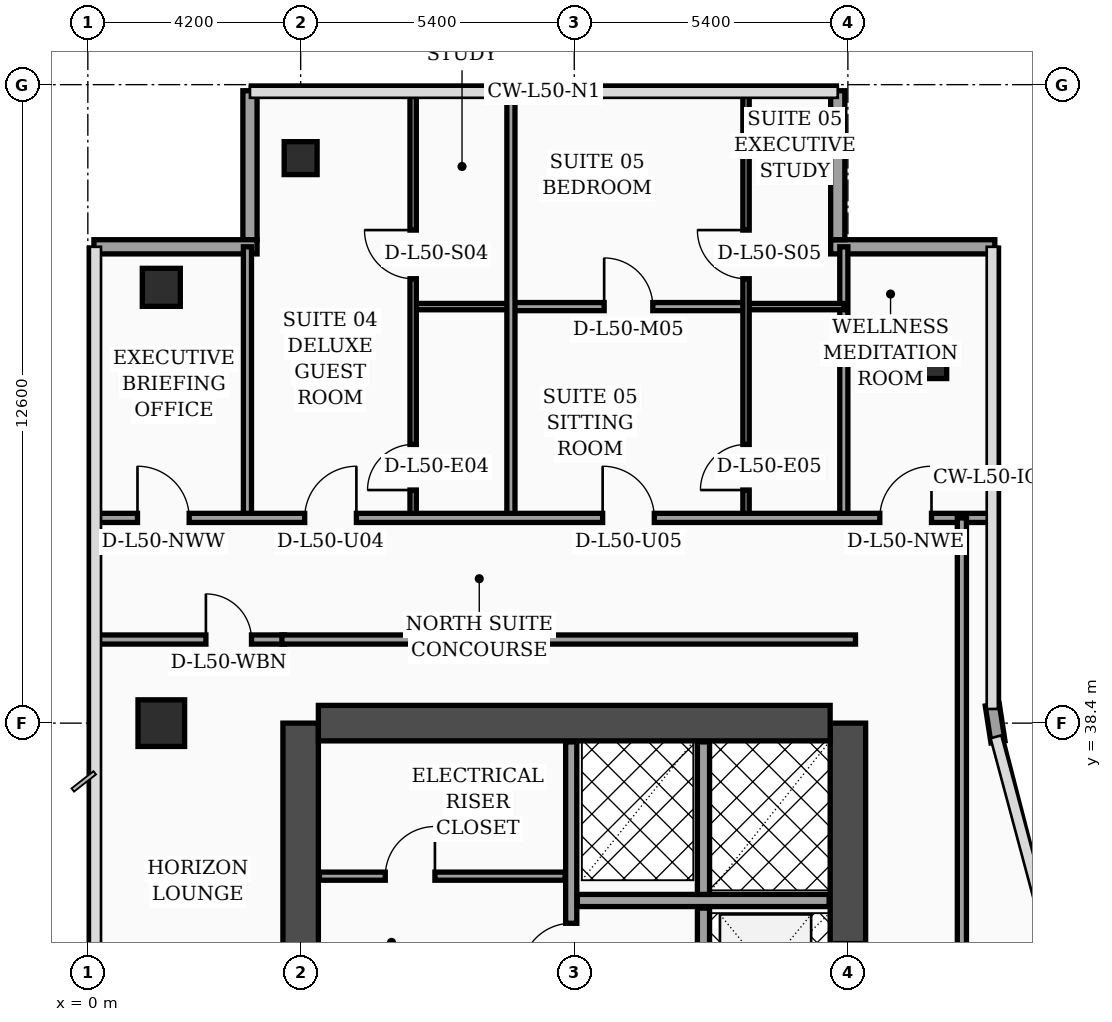
"""IFC4 building model, lengths in metres.
Left out: names, types, materials, properties, quantities, classifications, styles, units other than length and angle.
Written with IfcOpenShell. Run it as: python <this file> out.ifc"""

import sys

from ifc_helpers import new_model, si_unit, direction, frame, frame_2d, origin, origin_2d, place, context, subcontext, project, spatial, rectangle, hollow_rectangle, extrude, element, fill, save


model = new_model("IFC4")
c1 = context("Model", 3, precision=1e-05, world=origin(), true_north=direction((0.0, 1.0)))
c2 = subcontext(c1, "Body", "Model", "MODEL_VIEW")
j1 = project(units=[si_unit("LENGTHUNIT", "METRE"), si_unit("PLANEANGLEUNIT", "RADIAN")], contexts=[c1])
p1 = place(None, origin())
s1 = spatial("IfcSite", under=j1, at=p1, CompositionType="ELEMENT")
p2 = place(p1, origin())
s2 = spatial("IfcBuilding", under=s1, at=p2, CompositionType="ELEMENT")
p3 = place(p2, frame((0.0, 0.0, 203.4)))
s3 = spatial("IfcBuildingStorey", under=s2, at=p3, CompositionType="ELEMENT", Elevation=203.4)
p4 = place(p3, frame((4.2, 16.8, 0.0), z_axis=(0.0, 0.0, 1.0), x_axis=(0.0, 1.0, 0.0)))
e1 = element("IfcWall", 1, at=p4, inside=s3, PredefinedType="SHEAR", context=c2, shape_type="SweptSolid", body=[
    extrude(rectangle(XDim=21.6, YDim=0.7, at=frame_2d((10.8, 0.0))), origin(), (0.0, 0.0, 1.0), 3.56),
])
p5 = place(p3, frame((15.0, 16.8, 0.0), z_axis=(0.0, 0.0, 1.0), x_axis=(0.0, 1.0, 0.0)))
e2 = element("IfcWall", 2, at=p5, inside=s3, PredefinedType="SHEAR", context=c2, shape_type="SweptSolid", body=[
    extrude(rectangle(XDim=21.6, YDim=0.7, at=frame_2d((10.8, 0.0))), origin(), (0.0, 0.0, 1.0), 3.56),
])
p6 = place(p5, frame((8.65, 0.0, 0.0)))
e3 = element("IfcOpeningElement", 3, at=p6, cuts=e2, PredefinedType="OPENING", context=c2, shape_type="SweptSolid", body=[
    extrude(rectangle(XDim=1.1, YDim=2.2, at=frame_2d((0.55, 1.1))), frame((0.0, 0.36, 0.0), z_axis=(0.0, -1.0, 0.0), x_axis=(1.0, 0.0, 0.0)), (0.0, 0.0, 1.0), 0.72),
])
p7 = place(p5, frame((10.85, 0.0, 0.0)))
e4 = element("IfcOpeningElement", 4, at=p7, cuts=e2, PredefinedType="OPENING", context=c2, shape_type="SweptSolid", body=[
    extrude(rectangle(XDim=1.1, YDim=2.2, at=frame_2d((0.55, 1.1))), frame((0.0, 0.36, 0.0), z_axis=(0.0, -1.0, 0.0), x_axis=(1.0, 0.0, 0.0)), (0.0, 0.0, 1.0), 0.72),
])
p8 = place(p5, frame((13.5, 0.0, 0.0)))
e5 = element("IfcOpeningElement", 5, at=p8, cuts=e2, PredefinedType="OPENING", context=c2, shape_type="SweptSolid", body=[
    extrude(rectangle(XDim=1.1, YDim=2.2, at=frame_2d((0.55, 1.1))), frame((0.0, 0.36, 0.0), z_axis=(0.0, -1.0, 0.0), x_axis=(1.0, 0.0, 0.0)), (0.0, 0.0, 1.0), 0.72),
])
p9 = place(p5, frame((16.15, 0.0, 0.0)))
e6 = element("IfcOpeningElement", 6, at=p9, cuts=e2, PredefinedType="OPENING", context=c2, shape_type="SweptSolid", body=[
    extrude(rectangle(XDim=1.1, YDim=2.2, at=frame_2d((0.55, 1.1))), frame((0.0, 0.36, 0.0), z_axis=(0.0, -1.0, 0.0), x_axis=(1.0, 0.0, 0.0)), (0.0, 0.0, 1.0), 0.72),
])
p10 = place(p3, frame((4.55, 38.4, 0.0), z_axis=(0.0, 0.0, 1.0), x_axis=(1.0, 0.0, 0.0)))
e7 = element("IfcWall", 7, at=p10, inside=s3, PredefinedType="SHEAR", context=c2, shape_type="SweptSolid", body=[
    extrude(rectangle(XDim=10.1, YDim=0.7, at=frame_2d((5.05, 0.0))), origin(), (0.0, 0.0, 1.0), 3.56),
])
p11 = place(p3, frame((1.45, 38.4, 0.0), z_axis=(0.0, 0.0, 1.0), x_axis=(1.0, 0.0, 0.0)))
e8 = element("IfcColumn", 8, at=p11, inside=s3, PredefinedType="COLUMN", context=c2, shape_type="SweptSolid", body=[
    extrude(rectangle(XDim=0.92, YDim=0.92, at=origin_2d()), origin(), (0.0, 0.0, 1.0), 3.56),
])
p12 = place(p3, frame((1.45, 47.0, 0.0), z_axis=(0.0, 0.0, 1.0), x_axis=(1.0, 0.0, 0.0)))
e9 = element("IfcColumn", 9, at=p12, inside=s3, PredefinedType="COLUMN", context=c2, shape_type="SweptSolid", body=[
    extrude(hollow_rectangle(XDim=0.75, YDim=0.75, WallThickness=0.032, at=origin_2d()), origin(), (0.0, 0.0, 1.0), 3.56),
])
p13 = place(p3, frame((4.2, 49.55, 0.0), z_axis=(0.0, 0.0, 1.0), x_axis=(1.0, 0.0, 0.0)))
e10 = element("IfcColumn", 10, at=p13, inside=s3, PredefinedType="COLUMN", context=c2, shape_type="SweptSolid", body=[
    extrude(hollow_rectangle(XDim=0.65, YDim=0.65, WallThickness=0.028, at=origin_2d()), origin(), (0.0, 0.0, 1.0), 3.56),
])
p14 = place(p3, frame((16.55, 45.6, 0.0), z_axis=(0.0, 0.0, 1.0), x_axis=(1.0, 0.0, 0.0)))
e11 = element("IfcColumn", 11, at=p14, inside=s3, PredefinedType="COLUMN", context=c2, shape_type="SweptSolid", body=[
    extrude(rectangle(XDim=0.8, YDim=0.8, at=origin_2d()), origin(), (0.0, 0.0, 1.0), 3.56),
])
p15 = place(p3, frame((17.962, 38.03, 0.0), z_axis=(0.0, 0.0, 1.0), x_axis=(-0.15141125477, 0.988470855377, 0.0)))
e12 = element("IfcWall", 12, at=p15, inside=s3, PredefinedType="SOLIDWALL", context=c2, shape_type="SweptSolid", body=[
    extrude(rectangle(XDim=0.739, YDim=0.28, at=frame_2d((0.369, 0.0))), origin(), (0.0, 0.0, 1.0), 3.56),
])
p16 = place(p3, frame((17.9, 47.8, 0.0), z_axis=(0.0, 0.0, 1.0), x_axis=(-1.0, 0.0, 0.0)))
e13 = element("IfcWall", 13, at=p16, inside=s3, PredefinedType="SOLIDWALL", context=c2, shape_type="SweptSolid", body=[
    extrude(rectangle(XDim=3.24, YDim=0.28, at=frame_2d((1.62, 0.0))), origin(), (0.0, 0.0, 1.0), 3.56),
])
p17 = place(p3, frame((14.8, 47.94, 0.0), z_axis=(0.0, 0.0, 1.0), x_axis=(0.0, 1.0, 0.0)))
e14 = element("IfcWall", 14, at=p17, inside=s3, PredefinedType="SOLIDWALL", context=c2, shape_type="SweptSolid", body=[
    extrude(rectangle(XDim=2.94, YDim=0.28, at=frame_2d((1.47, 0.0))), origin(), (0.0, 0.0, 1.0), 3.56),
])
p18 = place(p3, frame((3.2, 50.88, 0.0), z_axis=(0.0, 0.0, 1.0), x_axis=(0.0, -1.0, 0.0)))
e15 = element("IfcWall", 15, at=p18, inside=s3, PredefinedType="SOLIDWALL", context=c2, shape_type="SweptSolid", body=[
    extrude(rectangle(XDim=2.94, YDim=0.28, at=frame_2d((1.47, 0.0))), origin(), (0.0, 0.0, 1.0), 3.09),
])
p19 = place(p3, frame((3.34, 47.8, 0.0), z_axis=(0.0, 0.0, 1.0), x_axis=(-1.0, 0.0, 0.0)))
e16 = element("IfcWall", 16, at=p19, inside=s3, PredefinedType="SOLIDWALL", context=c2, shape_type="SweptSolid", body=[
    extrude(rectangle(XDim=3.22, YDim=0.28, at=frame_2d((1.61, 0.0))), origin(), (0.0, 0.0, 1.0), 3.09),
])
p20 = place(p3, frame((4.57, 35.38, 0.0), z_axis=(0.0, 0.0, 1.0), x_axis=(1.0, 0.0, 0.0)))
e17 = element("IfcWall", 17, at=p20, inside=s3, PredefinedType="PARTITIONING", context=c2, shape_type="SweptSolid", body=[
    extrude(rectangle(XDim=4.85, YDim=0.16, at=frame_2d((2.425, 0.0))), origin(), (0.0, 0.0, 1.0), 3.56),
])
p21 = place(p20, frame((1.3, 0.0, 0.0)))
e18 = element("IfcOpeningElement", 18, at=p21, cuts=e17, PredefinedType="OPENING", context=c2, shape_type="SweptSolid", body=[
    extrude(rectangle(XDim=0.98, YDim=2.15, at=frame_2d((0.49, 1.075))), frame((0.0, 0.09, 0.0), z_axis=(0.0, -1.0, 0.0), x_axis=(1.0, 0.0, 0.0)), (0.0, 0.0, 1.0), 0.18),
])
p22 = place(p3, frame((9.54, 32.92, 0.0), z_axis=(0.0, 0.0, 1.0), x_axis=(0.0, 1.0, 0.0)))
e19 = element("IfcWall", 19, at=p22, inside=s3, PredefinedType="SOLIDWALL", context=c2, shape_type="SweptSolid", body=[
    extrude(rectangle(XDim=5.11, YDim=0.22, at=frame_2d((2.555, 0.0))), origin(), (0.0, 0.0, 1.0), 3.56),
])
p23 = place(p22, frame((0.55, 0.0, 0.0)))
e20 = element("IfcOpeningElement", 20, at=p23, cuts=e19, PredefinedType="OPENING", context=c2, shape_type="SweptSolid", body=[
    extrude(rectangle(XDim=0.98, YDim=2.15, at=frame_2d((0.49, 1.075))), frame((0.0, 0.12, 0.0), z_axis=(0.0, -1.0, 0.0), x_axis=(1.0, 0.0, 0.0)), (0.0, 0.0, 1.0), 0.24),
])
p24 = place(p3, frame((12.15, 27.0, 0.0), z_axis=(0.0, 0.0, 1.0), x_axis=(0.0, 1.0, 0.0)))
e21 = element("IfcWall", 21, at=p24, inside=s3, PredefinedType="SOLIDWALL", context=c2, shape_type="SweptSolid", body=[
    extrude(rectangle(XDim=7.75, YDim=0.24, at=frame_2d((3.875, 0.0))), origin(), (0.0, 0.0, 1.0), 3.56),
])
p25 = place(p3, frame((9.66, 34.9, 0.0), z_axis=(0.0, 0.0, 1.0), x_axis=(1.0, 0.0, 0.0)))
e22 = element("IfcWall", 22, at=p25, inside=s3, PredefinedType="SOLIDWALL", context=c2, shape_type="SweptSolid", body=[
    extrude(rectangle(XDim=4.97, YDim=0.24, at=frame_2d((2.485, 0.0))), origin(), (0.0, 0.0, 1.0), 3.56),
])
p26 = place(p3, frame((12.15, 35.02, 0.0), z_axis=(0.0, 0.0, 1.0), x_axis=(0.0, 1.0, 0.0)))
e23 = element("IfcWall", 23, at=p26, inside=s3, PredefinedType="SOLIDWALL", context=c2, shape_type="SweptSolid", body=[
    extrude(rectangle(XDim=3.01, YDim=0.24, at=frame_2d((1.505, 0.0))), origin(), (0.0, 0.0, 1.0), 3.56),
])
p27 = place(p3, frame((0.08, 40.05, 0.0), z_axis=(0.0, 0.0, 1.0), x_axis=(1.0, 0.0, 0.0)))
e24 = element("IfcWall", 24, at=p27, inside=s3, PredefinedType="PARTITIONING", context=c2, shape_type="SweptSolid", body=[
    extrude(rectangle(XDim=3.8, YDim=0.18, at=frame_2d((1.9, 0.0))), origin(), (0.0, 0.0, 1.0), 2.94),
])
p28 = place(p27, frame((2.25, 0.0, 0.0)))
e25 = element("IfcOpeningElement", 25, at=p28, cuts=e24, PredefinedType="OPENING", context=c2, shape_type="SweptSolid", body=[
    extrude(rectangle(XDim=0.9, YDim=2.15, at=frame_2d((0.45, 1.075))), frame((0.0, 0.1, 0.0), z_axis=(0.0, -1.0, 0.0), x_axis=(1.0, 0.0, 0.0)), (0.0, 0.0, 1.0), 0.2),
])
p29 = place(p3, frame((3.15, 42.45, 0.0), z_axis=(0.0, 0.0, 1.0), x_axis=(0.0, 1.0, 0.0)))
e26 = element("IfcWall", 26, at=p29, inside=s3, PredefinedType="PARTITIONING", context=c2, shape_type="SweptSolid", body=[
    extrude(rectangle(XDim=5.35, YDim=0.16, at=frame_2d((2.675, 0.0))), origin(), (0.0, 0.0, 1.0), 3.14),
])
p30 = place(p3, frame((14.92, 42.45, 0.0), z_axis=(0.0, 0.0, 1.0), x_axis=(0.0, 1.0, 0.0)))
e27 = element("IfcWall", 27, at=p30, inside=s3, PredefinedType="PARTITIONING", context=c2, shape_type="SweptSolid", body=[
    extrude(rectangle(XDim=5.35, YDim=0.16, at=frame_2d((2.675, 0.0))), origin(), (0.0, 0.0, 1.0), 3.09),
])
p31 = place(p3, frame((6.42, 46.62, 0.0), z_axis=(0.0, 0.0, 1.0), x_axis=(1.0, 0.0, 0.0)))
e28 = element("IfcWall", 28, at=p31, inside=s3, PredefinedType="PARTITIONING", context=c2, shape_type="SweptSolid", body=[
    extrude(rectangle(XDim=1.93, YDim=0.125, at=frame_2d((0.965, 0.0))), origin(), (0.0, 0.0, 1.0), 3.56),
])
p32 = place(p3, frame((6.42, 42.45, 0.0), z_axis=(0.0, 0.0, 1.0), x_axis=(0.0, 1.0, 0.0)))
e29 = element("IfcWall", 29, at=p32, inside=s3, PredefinedType="PARTITIONING", context=c2, shape_type="SweptSolid", body=[
    extrude(rectangle(XDim=8.49, YDim=0.125, at=frame_2d((4.245, 0.0))), origin(), (0.0, 0.0, 1.0), 3.09),
])
p33 = place(p32, frame((0.55, 0.0, 0.0)))
e30 = element("IfcOpeningElement", 30, at=p33, cuts=e29, PredefinedType="OPENING", context=c2, shape_type="SweptSolid", body=[
    extrude(rectangle(XDim=0.9, YDim=2.15, at=frame_2d((0.45, 1.075))), frame((0.0, 0.073, 0.0), z_axis=(0.0, -1.0, 0.0), x_axis=(1.0, 0.0, 0.0)), (0.0, 0.0, 1.0), 0.145),
])
p34 = place(p32, frame((4.72, 0.0, 0.0)))
e31 = element("IfcOpeningElement", 31, at=p34, cuts=e29, PredefinedType="OPENING", context=c2, shape_type="SweptSolid", body=[
    extrude(rectangle(XDim=0.96, YDim=2.2, at=frame_2d((0.48, 1.1))), frame((0.0, 0.073, 0.0), z_axis=(0.0, -1.0, 0.0), x_axis=(1.0, 0.0, 0.0)), (0.0, 0.0, 1.0), 0.145),
])
p35 = place(p3, frame((12.99, 46.62, 0.0), z_axis=(0.0, 0.0, 1.0), x_axis=(1.0, 0.0, 0.0)))
e32 = element("IfcWall", 32, at=p35, inside=s3, PredefinedType="PARTITIONING", context=c2, shape_type="SweptSolid", body=[
    extrude(rectangle(XDim=1.93, YDim=0.125, at=frame_2d((0.965, 0.0))), origin(), (0.0, 0.0, 1.0), 3.09),
])
p36 = place(p3, frame((8.35, 46.62, 0.0), z_axis=(0.0, 0.0, 1.0), x_axis=(1.0, 0.0, 0.0)))
e33 = element("IfcWall", 33, at=p36, inside=s3, PredefinedType="PARTITIONING", context=c2, shape_type="SweptSolid", body=[
    extrude(rectangle(XDim=4.64, YDim=0.16, at=frame_2d((2.32, 0.0))), origin(), (0.0, 0.0, 1.0), 3.09),
])
p37 = place(p36, frame((1.84, 0.0, 0.0)))
e34 = element("IfcOpeningElement", 34, at=p37, cuts=e33, PredefinedType="OPENING", context=c2, shape_type="SweptSolid", body=[
    extrude(rectangle(XDim=0.96, YDim=2.2, at=frame_2d((0.48, 1.1))), frame((0.0, 0.09, 0.0), z_axis=(0.0, -1.0, 0.0), x_axis=(1.0, 0.0, 0.0)), (0.0, 0.0, 1.0), 0.18),
])
p38 = place(p3, frame((12.99, 42.45, 0.0), z_axis=(0.0, 0.0, 1.0), x_axis=(0.0, 1.0, 0.0)))
e35 = element("IfcWall", 35, at=p38, inside=s3, PredefinedType="PARTITIONING", context=c2, shape_type="SweptSolid", body=[
    extrude(rectangle(XDim=8.49, YDim=0.125, at=frame_2d((4.245, 0.0))), origin(), (0.0, 0.0, 1.0), 3.09),
])
p39 = place(p38, frame((0.55, 0.0, 0.0)))
e36 = element("IfcOpeningElement", 36, at=p39, cuts=e35, PredefinedType="OPENING", context=c2, shape_type="SweptSolid", body=[
    extrude(rectangle(XDim=0.9, YDim=2.15, at=frame_2d((0.45, 1.075))), frame((0.0, 0.073, 0.0), z_axis=(0.0, -1.0, 0.0), x_axis=(1.0, 0.0, 0.0)), (0.0, 0.0, 1.0), 0.145),
])
p40 = place(p38, frame((4.72, 0.0, 0.0)))
e37 = element("IfcOpeningElement", 37, at=p40, cuts=e35, PredefinedType="OPENING", context=c2, shape_type="SweptSolid", body=[
    extrude(rectangle(XDim=0.96, YDim=2.2, at=frame_2d((0.48, 1.1))), frame((0.0, 0.073, 0.0), z_axis=(0.0, -1.0, 0.0), x_axis=(1.0, 0.0, 0.0)), (0.0, 0.0, 1.0), 0.145),
])
p41 = place(p3, frame((8.35, 42.45, 0.0), z_axis=(0.0, 0.0, 1.0), x_axis=(0.0, 1.0, 0.0)))
e38 = element("IfcWall", 38, at=p41, inside=s3, PredefinedType="PARTITIONING", context=c2, shape_type="SweptSolid", body=[
    extrude(rectangle(XDim=8.49, YDim=0.16, at=frame_2d((4.245, 0.0))), origin(), (0.0, 0.0, 1.0), 3.09),
])
p42 = place(p3, frame((0.08, 42.45, 0.0), z_axis=(0.0, 0.0, 1.0), x_axis=(1.0, 0.0, 0.0)))
e39 = element("IfcWall", 39, at=p42, inside=s3, PredefinedType="PARTITIONING", context=c2, shape_type="SweptSolid", body=[
    extrude(rectangle(XDim=17.77, YDim=0.18, at=frame_2d((8.885, 0.0))), origin(), (0.0, 0.0, 1.0), 2.94),
])
p43 = place(p42, frame((0.9, 0.0, 0.0)))
e40 = element("IfcOpeningElement", 40, at=p43, cuts=e39, PredefinedType="OPENING", context=c2, shape_type="SweptSolid", body=[
    extrude(rectangle(XDim=1.02, YDim=2.2, at=frame_2d((0.51, 1.1))), frame((0.0, 0.1, 0.0), z_axis=(0.0, -1.0, 0.0), x_axis=(1.0, 0.0, 0.0)), (0.0, 0.0, 1.0), 0.2),
])
p44 = place(p42, frame((4.2, 0.0, 0.0)))
e41 = element("IfcOpeningElement", 41, at=p44, cuts=e39, PredefinedType="OPENING", context=c2, shape_type="SweptSolid", body=[
    extrude(rectangle(XDim=1.02, YDim=2.2, at=frame_2d((0.51, 1.1))), frame((0.0, 0.1, 0.0), z_axis=(0.0, -1.0, 0.0), x_axis=(1.0, 0.0, 0.0)), (0.0, 0.0, 1.0), 0.2),
])
p45 = place(p42, frame((10.08, 0.0, 0.0)))
e42 = element("IfcOpeningElement", 42, at=p45, cuts=e39, PredefinedType="OPENING", context=c2, shape_type="SweptSolid", body=[
    extrude(rectangle(XDim=1.02, YDim=2.2, at=frame_2d((0.51, 1.1))), frame((0.0, 0.1, 0.0), z_axis=(0.0, -1.0, 0.0), x_axis=(1.0, 0.0, 0.0)), (0.0, 0.0, 1.0), 0.2),
])
p46 = place(p42, frame((15.55, 0.0, 0.0)))
e43 = element("IfcOpeningElement", 43, at=p46, cuts=e39, PredefinedType="OPENING", context=c2, shape_type="SweptSolid", body=[
    extrude(rectangle(XDim=1.02, YDim=2.2, at=frame_2d((0.51, 1.1))), frame((0.0, 0.1, 0.0), z_axis=(0.0, -1.0, 0.0), x_axis=(1.0, 0.0, 0.0)), (0.0, 0.0, 1.0), 0.2),
])
p47 = place(p3, frame((17.25, 24.3, 0.0), z_axis=(0.0, 0.0, 1.0), x_axis=(0.0, 1.0, 0.0)))
e44 = element("IfcWall", 44, at=p47, inside=s3, PredefinedType="PARTITIONING", context=c2, shape_type="SweptSolid", body=[
    extrude(rectangle(XDim=18.15, YDim=0.18, at=frame_2d((9.075, 0.0))), origin(), (0.0, 0.0, 1.0), 2.94),
])
p48 = place(p3, frame((3.83, 40.05, 0.0), z_axis=(0.0, 0.0, 1.0), x_axis=(1.0, 0.0, 0.0)))
e45 = element("IfcWall", 45, at=p48, inside=s3, PredefinedType="PARTITIONING", context=c2, shape_type="SweptSolid", body=[
    extrude(rectangle(XDim=11.32, YDim=0.18, at=frame_2d((5.66, 0.0))), origin(), (0.0, 0.0, 1.0), 2.94),
])
p49 = place(p21, origin())
e46 = element("IfcDoor", 46, at=p49, inside=s3, OperationType="SINGLE_SWING_RIGHT", PredefinedType="DOOR", context=c2, shape_type="SweptSolid", body=[
    extrude(rectangle(XDim=0.98, YDim=2.15, at=frame_2d((0.49, 1.075))), frame((0.0, 0.025, 0.0), z_axis=(0.0, -1.0, 0.0), x_axis=(1.0, 0.0, 0.0)), (0.0, 0.0, 1.0), 0.05),
])
fill(e18, e46)
p50 = place(p23, origin())
e47 = element("IfcDoor", 47, at=p50, inside=s3, OperationType="SINGLE_SWING_LEFT", PredefinedType="DOOR", context=c2, shape_type="SweptSolid", body=[
    extrude(rectangle(XDim=0.98, YDim=2.15, at=frame_2d((0.49, 1.075))), frame((0.0, 0.025, 0.0), z_axis=(0.0, -1.0, 0.0), x_axis=(1.0, 0.0, 0.0)), (0.0, 0.0, 1.0), 0.05),
])
fill(e20, e47)
p51 = place(p28, origin())
e48 = element("IfcDoor", 48, at=p51, inside=s3, OperationType="SINGLE_SWING_LEFT", PredefinedType="DOOR", context=c2, shape_type="SweptSolid", body=[
    extrude(rectangle(XDim=0.9, YDim=2.15, at=frame_2d((0.45, 1.075))), frame((0.0, 0.025, 0.0), z_axis=(0.0, -1.0, 0.0), x_axis=(1.0, 0.0, 0.0)), (0.0, 0.0, 1.0), 0.05),
])
fill(e25, e48)
p52 = place(p33, origin())
e49 = element("IfcDoor", 49, at=p52, inside=s3, OperationType="SINGLE_SWING_LEFT", PredefinedType="DOOR", context=c2, shape_type="SweptSolid", body=[
    extrude(rectangle(XDim=0.9, YDim=2.15, at=frame_2d((0.45, 1.075))), frame((0.0, 0.025, 0.0), z_axis=(0.0, -1.0, 0.0), x_axis=(1.0, 0.0, 0.0)), (0.0, 0.0, 1.0), 0.05),
])
fill(e30, e49)
p53 = place(p34, origin())
e50 = element("IfcDoor", 50, at=p53, inside=s3, OperationType="SINGLE_SWING_RIGHT", PredefinedType="DOOR", context=c2, shape_type="SweptSolid", body=[
    extrude(rectangle(XDim=0.96, YDim=2.2, at=frame_2d((0.48, 1.1))), frame((0.0, 0.025, 0.0), z_axis=(0.0, -1.0, 0.0), x_axis=(1.0, 0.0, 0.0)), (0.0, 0.0, 1.0), 0.05),
])
fill(e31, e50)
p54 = place(p37, origin())
e51 = element("IfcDoor", 51, at=p54, inside=s3, OperationType="SINGLE_SWING_LEFT", PredefinedType="DOOR", context=c2, shape_type="SweptSolid", body=[
    extrude(rectangle(XDim=0.96, YDim=2.2, at=frame_2d((0.48, 1.1))), frame((0.0, 0.025, 0.0), z_axis=(0.0, -1.0, 0.0), x_axis=(1.0, 0.0, 0.0)), (0.0, 0.0, 1.0), 0.05),
])
fill(e34, e51)
p55 = place(p39, origin())
e52 = element("IfcDoor", 52, at=p55, inside=s3, OperationType="SINGLE_SWING_LEFT", PredefinedType="DOOR", context=c2, shape_type="SweptSolid", body=[
    extrude(rectangle(XDim=0.9, YDim=2.15, at=frame_2d((0.45, 1.075))), frame((0.0, 0.025, 0.0), z_axis=(0.0, -1.0, 0.0), x_axis=(1.0, 0.0, 0.0)), (0.0, 0.0, 1.0), 0.05),
])
fill(e36, e52)
p56 = place(p40, origin())
e53 = element("IfcDoor", 53, at=p56, inside=s3, OperationType="SINGLE_SWING_RIGHT", PredefinedType="DOOR", context=c2, shape_type="SweptSolid", body=[
    extrude(rectangle(XDim=0.96, YDim=2.2, at=frame_2d((0.48, 1.1))), frame((0.0, 0.025, 0.0), z_axis=(0.0, -1.0, 0.0), x_axis=(1.0, 0.0, 0.0)), (0.0, 0.0, 1.0), 0.05),
])
fill(e37, e53)
p57 = place(p43, origin())
e54 = element("IfcDoor", 54, at=p57, inside=s3, OperationType="SINGLE_SWING_LEFT", PredefinedType="DOOR", context=c2, shape_type="SweptSolid", body=[
    extrude(rectangle(XDim=1.02, YDim=2.2, at=frame_2d((0.51, 1.1))), frame((0.0, 0.025, 0.0), z_axis=(0.0, -1.0, 0.0), x_axis=(1.0, 0.0, 0.0)), (0.0, 0.0, 1.0), 0.05),
])
fill(e40, e54)
p58 = place(p44, origin())
e55 = element("IfcDoor", 55, at=p58, inside=s3, OperationType="SINGLE_SWING_RIGHT", PredefinedType="DOOR", context=c2, shape_type="SweptSolid", body=[
    extrude(rectangle(XDim=1.02, YDim=2.2, at=frame_2d((0.51, 1.1))), frame((0.0, 0.025, 0.0), z_axis=(0.0, -1.0, 0.0), x_axis=(1.0, 0.0, 0.0)), (0.0, 0.0, 1.0), 0.05),
])
fill(e41, e55)
p59 = place(p45, origin())
e56 = element("IfcDoor", 56, at=p59, inside=s3, OperationType="SINGLE_SWING_LEFT", PredefinedType="DOOR", context=c2, shape_type="SweptSolid", body=[
    extrude(rectangle(XDim=1.02, YDim=2.2, at=frame_2d((0.51, 1.1))), frame((0.0, 0.025, 0.0), z_axis=(0.0, -1.0, 0.0), x_axis=(1.0, 0.0, 0.0)), (0.0, 0.0, 1.0), 0.05),
])
fill(e42, e56)
p60 = place(p46, origin())
e57 = element("IfcDoor", 57, at=p60, inside=s3, OperationType="SINGLE_SWING_RIGHT", PredefinedType="DOOR", context=c2, shape_type="SweptSolid", body=[
    extrude(rectangle(XDim=1.02, YDim=2.2, at=frame_2d((0.51, 1.1))), frame((0.0, 0.025, 0.0), z_axis=(0.0, -1.0, 0.0), x_axis=(1.0, 0.0, 0.0)), (0.0, 0.0, 1.0), 0.05),
])
fill(e43, e57)
save(model, sys.argv[1])
